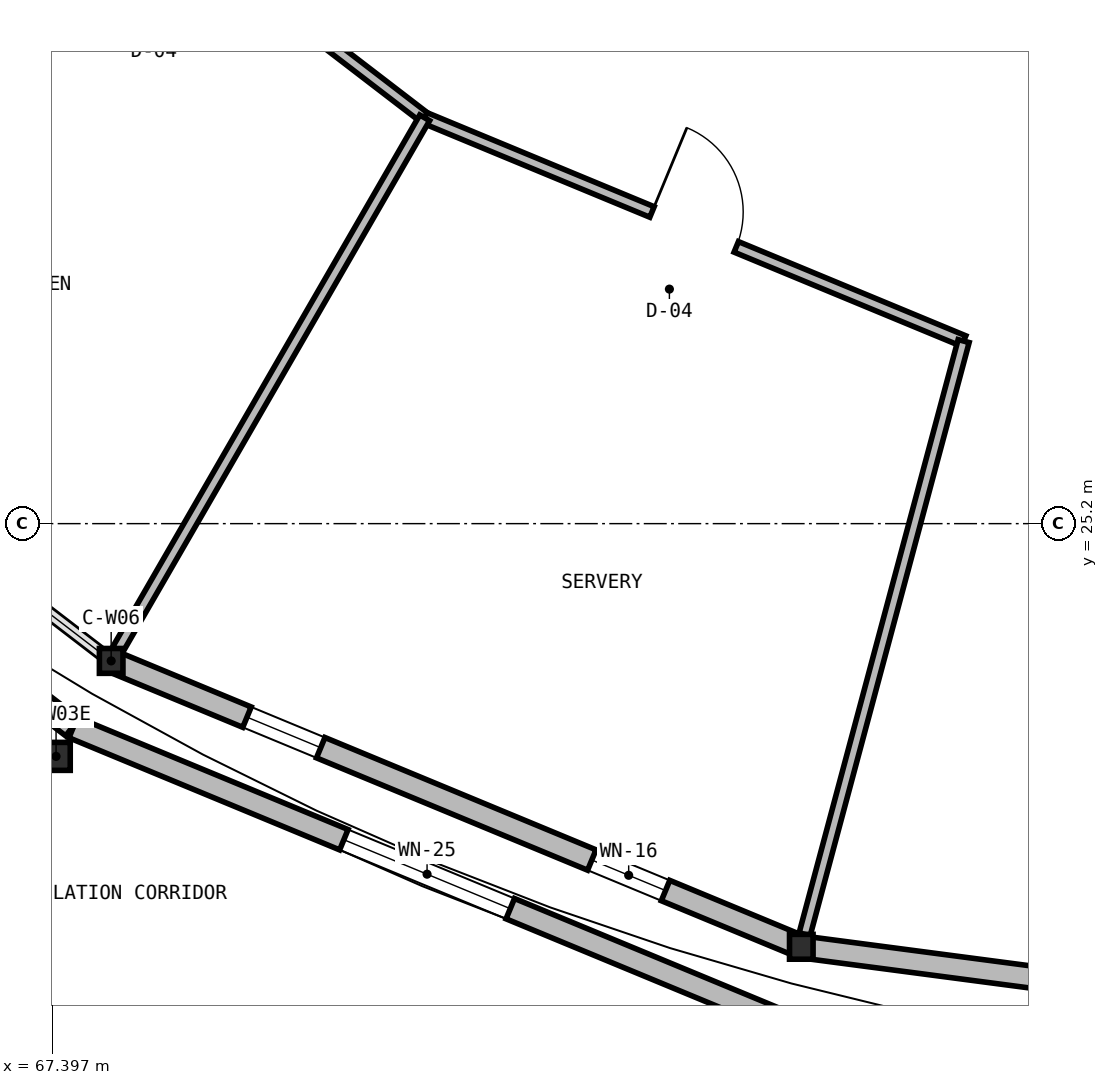
"""IFC4 building model, lengths in metres.
Left out: names, types, materials, properties, quantities, classifications, styles, units other than length and angle.
Written with IfcOpenShell. Run it as: python <this file> out.ifc"""

import sys

from ifc_helpers import new_model, si_unit, direction, frame, frame_2d, origin, origin_2d, place, context, subcontext, project, spatial, rectangle, i_section, extrude, element, fill, save


model = new_model("IFC4")
c1 = context("Model", 3, precision=1e-05, world=origin(), true_north=direction((0.0, 1.0)))
c2 = subcontext(c1, "Body", "Model", "MODEL_VIEW")
j1 = project(units=[si_unit("LENGTHUNIT", "METRE"), si_unit("PLANEANGLEUNIT", "RADIAN")], contexts=[c1])
p1 = place(None, origin())
s1 = spatial("IfcSite", under=j1, at=p1, CompositionType="ELEMENT")
p2 = place(p1, origin())
s2 = spatial("IfcBuilding", under=s1, at=p2, CompositionType="ELEMENT")
p3 = place(p2, origin())
s3 = spatial("IfcBuildingStorey", under=s2, at=p3, CompositionType="ELEMENT", Elevation=0.0)
p4 = place(p3, frame((67.45, 22.138, 0.0), z_axis=(0.0, 0.0, 1.0), x_axis=(1.0, 0.0, 0.0)))
e1 = element("IfcColumn", 1, at=p4, inside=s3, PredefinedType="COLUMN", context=c2, shape_type="SweptSolid", body=[
    extrude(i_section(OverallWidth=0.373, OverallDepth=0.368, WebThickness=0.017, FlangeThickness=0.027, at=origin_2d()), origin(), (0.0, 0.0, 1.0), 5.25),
])
for number, where, z_axis, x_axis in (
    (2, (68.175, 23.394, 0.0), (0.0, 0.0, 1.0), (1.0, 0.0, 0.0)),
    (3, (77.255, 19.633, 0.0), (0.0, 0.0, 1.0), (1.0, 0.0, 0.0)),
):
    element("IfcColumn", number, at=place(p3, frame(where, z_axis=z_axis, x_axis=x_axis)), inside=s3, PredefinedType="COLUMN", context=c2, shape_type="SweptSolid", body=[
        extrude(i_section(OverallWidth=0.31, OverallDepth=0.327, WebThickness=0.016, FlangeThickness=0.025, at=origin_2d()), origin(), (0.0, 0.0, 1.0), 5.25),
    ])
p5 = place(p3, frame((59.668, 28.659, 0.0), z_axis=(0.0, 0.0, 1.0), x_axis=(0.793371621275, -0.608737604027, 0.0)))
e4 = element("IfcWall", 4, at=p5, inside=s3, PredefinedType="SOLIDWALL", context=c2, shape_type="SweptSolid", body=[
    extrude(rectangle(XDim=10.08, YDim=0.29, at=frame_2d((5.04, 0.0))), origin(), (0.0, 0.0, 1.0), 4.516),
])
p6 = place(p5, frame((4.02, 0.0, 0.95)))
e5 = element("IfcOpeningElement", 5, at=p6, cuts=e4, PredefinedType="OPENING", context=c2, shape_type="SweptSolid", body=[
    extrude(rectangle(XDim=2.04, YDim=1.51, at=frame_2d((1.02, 0.755))), frame((0.0, 0.155, 0.0), z_axis=(0.0, -1.0, 0.0), x_axis=(1.0, 0.0, 0.0)), (0.0, 0.0, 1.0), 0.31),
])
p7 = place(p3, frame((67.675, 22.517, 0.0), z_axis=(0.0, 0.0, 1.0), x_axis=(0.92385889973, -0.382733240508, 0.0)))
e6 = element("IfcWall", 6, at=p7, inside=s3, PredefinedType="SOLIDWALL", context=c2, shape_type="SweptSolid", body=[
    extrude(rectangle(XDim=10.081, YDim=0.29, at=frame_2d((5.04, 0.0))), origin(), (0.0, 0.0, 1.0), 4.386),
])
p8 = place(p7, frame((3.855, 0.0, 0.95)))
e7 = element("IfcOpeningElement", 7, at=p8, cuts=e6, PredefinedType="OPENING", context=c2, shape_type="SweptSolid", body=[
    extrude(rectangle(XDim=2.37, YDim=1.43, at=frame_2d((1.185, 0.715))), frame((0.0, 0.155, 0.0), z_axis=(0.0, -1.0, 0.0), x_axis=(1.0, 0.0, 0.0)), (0.0, 0.0, 1.0), 0.31),
])
p9 = place(p3, frame((77.252, 19.634, 0.0), z_axis=(0.0, 0.0, 1.0), x_axis=(-0.923848052238, 0.382759423628, 0.0)))
e8 = element("IfcWall", 8, at=p9, inside=s3, PredefinedType="SOLIDWALL", context=c2, shape_type="SweptSolid", body=[
    extrude(rectangle(XDim=9.821, YDim=0.29, at=frame_2d((4.91, 0.0))), origin(), (0.0, 0.0, 1.0), 4.469),
])
p10 = place(p9, frame((1.93, 0.0, 0.95)))
e9 = element("IfcOpeningElement", 9, at=p10, cuts=e8, PredefinedType="OPENING", context=c2, shape_type="SweptSolid", body=[
    extrude(rectangle(XDim=1.05, YDim=1.8, at=frame_2d((0.525, 0.9))), frame((0.0, 0.155, 0.0), z_axis=(0.0, -1.0, 0.0), x_axis=(1.0, 0.0, 0.0)), (0.0, 0.0, 1.0), 0.31),
])
p11 = place(p9, frame((6.841, 0.0, 0.95)))
e10 = element("IfcOpeningElement", 10, at=p11, cuts=e8, PredefinedType="OPENING", context=c2, shape_type="SweptSolid", body=[
    extrude(rectangle(XDim=1.05, YDim=1.8, at=frame_2d((0.525, 0.9))), frame((0.0, 0.155, 0.0), z_axis=(0.0, -1.0, 0.0), x_axis=(1.0, 0.0, 0.0)), (0.0, 0.0, 1.0), 0.31),
])
p12 = place(p3, frame((86.996, 18.351, 0.0), z_axis=(0.0, 0.0, 1.0), x_axis=(-0.991456749128, 0.130435863969, 0.0)))
e11 = element("IfcWall", 11, at=p12, inside=s3, PredefinedType="SOLIDWALL", context=c2, shape_type="SweptSolid", body=[
    extrude(rectangle(XDim=9.821, YDim=0.29, at=frame_2d((4.911, 0.0))), origin(), (0.0, 0.0, 1.0), 4.593),
])
p13 = place(p12, frame((3.4, 0.0, 0.0)))
e12 = element("IfcOpeningElement", 12, at=p13, cuts=e11, PredefinedType="OPENING", context=c2, shape_type="SweptSolid", body=[
    extrude(rectangle(XDim=2.0, YDim=2.3, at=frame_2d((1.0, 1.15))), frame((0.0, 0.155, 0.0), z_axis=(0.0, -1.0, 0.0), x_axis=(1.0, 0.0, 0.0)), (0.0, 0.0, 1.0), 0.31),
])
p14 = place(p3, frame((65.86, 19.384, 0.0), z_axis=(0.0, 0.0, 1.0), x_axis=(0.923895514793, -0.382644845446, 0.0)))
e13 = element("IfcWall", 13, at=p14, inside=s3, PredefinedType="PARTITIONING", context=c2, shape_type="SweptSolid", body=[
    extrude(rectangle(XDim=11.037, YDim=0.15, at=frame_2d((5.518, 0.0))), origin(), (0.0, 0.0, 1.0), 4.391),
])
p15 = place(p14, frame((4.95, 0.0, 0.0)))
e14 = element("IfcOpeningElement", 14, at=p15, cuts=e13, PredefinedType="OPENING", context=c2, shape_type="SweptSolid", body=[
    extrude(rectangle(XDim=1.1, YDim=2.2, at=frame_2d((0.55, 1.1))), frame((0.0, 0.085, 0.0), z_axis=(0.0, -1.0, 0.0), x_axis=(1.0, 0.0, 0.0)), (0.0, 0.0, 1.0), 0.17),
])
p16 = place(p3, frame((66.211, 35.211, 0.0), z_axis=(0.0, 0.0, 1.0), x_axis=(0.793382566499, -0.60872333878, 0.0)))
e15 = element("IfcWall", 15, at=p16, inside=s3, PredefinedType="PARTITIONING", context=c2, shape_type="SweptSolid", body=[
    extrude(rectangle(XDim=7.675, YDim=0.15, at=frame_2d((3.837, 0.0))), origin(), (0.0, 0.0, 1.0), 4.93),
])
p17 = place(p16, frame((3.237, 0.0, 0.0)))
e16 = element("IfcOpeningElement", 16, at=p17, cuts=e15, PredefinedType="OPENING", context=c2, shape_type="SweptSolid", body=[
    extrude(rectangle(XDim=1.2, YDim=2.2, at=frame_2d((0.6, 1.1))), frame((0.0, 0.085, 0.0), z_axis=(0.0, -1.0, 0.0), x_axis=(1.0, 0.0, 0.0)), (0.0, 0.0, 1.0), 0.17),
])
p18 = place(p3, frame((72.3, 30.539, 0.0), z_axis=(0.0, 0.0, 1.0), x_axis=(0.923888899357, -0.382660818016, 0.0)))
e17 = element("IfcWall", 17, at=p18, inside=s3, PredefinedType="PARTITIONING", context=c2, shape_type="SweptSolid", body=[
    extrude(rectangle(XDim=7.675, YDim=0.15, at=frame_2d((3.838, 0.0))), origin(), (0.0, 0.0, 1.0), 4.93),
])
p19 = place(p18, frame((3.237, 0.0, 0.0)))
e18 = element("IfcOpeningElement", 18, at=p19, cuts=e17, PredefinedType="OPENING", context=c2, shape_type="SweptSolid", body=[
    extrude(rectangle(XDim=1.2, YDim=2.2, at=frame_2d((0.6, 1.1))), frame((0.0, 0.085, 0.0), z_axis=(0.0, -1.0, 0.0), x_axis=(1.0, 0.0, 0.0)), (0.0, 0.0, 1.0), 0.17),
])
for number, where, z_axis, x_axis in (
    (19, (72.3, 30.539, 0.0), (0.0, 0.0, 1.0), (-0.5, -0.866, 0.0)),
    (20, (79.391, 27.602, 0.0), (0.0, 0.0, 1.0), (-0.259, -0.966, 0.0)),
):
    element("IfcWall", number, at=place(p3, frame(where, z_axis=z_axis, x_axis=x_axis)), inside=s3, PredefinedType="PARTITIONING", context=c2, shape_type="SweptSolid", body=[
        extrude(rectangle(XDim=8.081, YDim=0.15, at=frame_2d((4.04, 0.0))), origin(), (0.0, 0.0, 1.0), 4.598),
    ])
p20 = place(p8, origin())
e21 = element("IfcWindow", 21, at=p20, inside=s3, PartitioningType="SINGLE_PANEL", PredefinedType="WINDOW", context=c2, shape_type="SweptSolid", body=[
    extrude(rectangle(XDim=2.37, YDim=1.43, at=frame_2d((1.185, 0.715))), frame((0.0, 0.03, 0.0), z_axis=(0.0, -1.0, 0.0), x_axis=(1.0, 0.0, 0.0)), (0.0, 0.0, 1.0), 0.06),
])
fill(e7, e21)
p21 = place(p10, origin())
e22 = element("IfcWindow", 22, at=p21, inside=s3, PartitioningType="SINGLE_PANEL", PredefinedType="WINDOW", context=c2, shape_type="SweptSolid", body=[
    extrude(rectangle(XDim=1.05, YDim=1.8, at=frame_2d((0.525, 0.9))), frame((0.0, 0.03, 0.0), z_axis=(0.0, -1.0, 0.0), x_axis=(1.0, 0.0, 0.0)), (0.0, 0.0, 1.0), 0.06),
])
fill(e9, e22)
p22 = place(p11, origin())
e23 = element("IfcWindow", 23, at=p22, inside=s3, PartitioningType="SINGLE_PANEL", PredefinedType="WINDOW", context=c2, shape_type="SweptSolid", body=[
    extrude(rectangle(XDim=1.05, YDim=1.8, at=frame_2d((0.525, 0.9))), frame((0.0, 0.03, 0.0), z_axis=(0.0, -1.0, 0.0), x_axis=(1.0, 0.0, 0.0)), (0.0, 0.0, 1.0), 0.06),
])
fill(e10, e23)
p23 = place(p19, origin())
e24 = element("IfcDoor", 24, at=p23, inside=s3, OperationType="SINGLE_SWING_LEFT", PredefinedType="DOOR", context=c2, shape_type="SweptSolid", body=[
    extrude(rectangle(XDim=1.2, YDim=2.2, at=frame_2d((0.6, 1.1))), frame((0.0, 0.025, 0.0), z_axis=(0.0, -1.0, 0.0), x_axis=(1.0, 0.0, 0.0)), (0.0, 0.0, 1.0), 0.05),
])
fill(e18, e24)
save(model, sys.argv[1])
